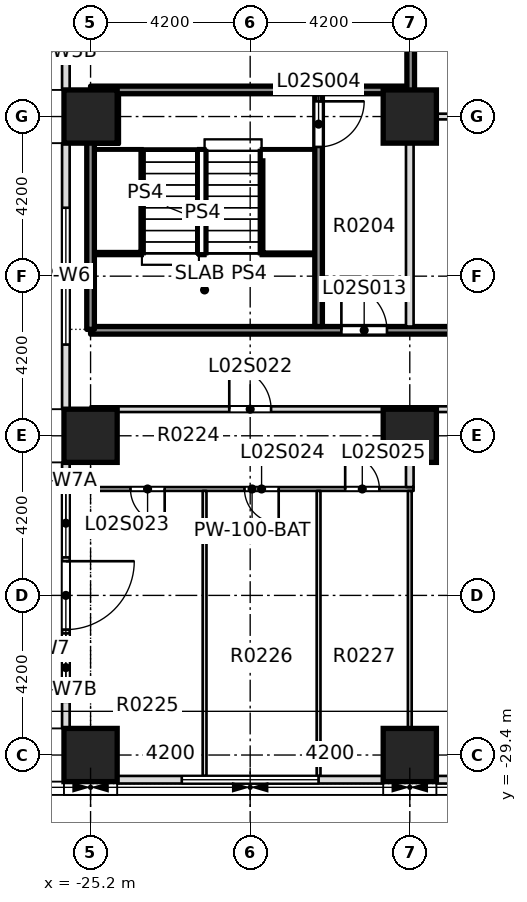
"""IFC4 building model, lengths in metres.
Left out: names, types, materials, properties, quantities, classifications, styles, units other than length and angle.
Written with IfcOpenShell. Run it as: python <this file> out.ifc"""

import sys

from ifc_helpers import new_model, si_unit, direction, frame, frame_2d, origin, origin_2d, place, context, subcontext, project, spatial, rectangle, extrude, element, fill, save


model = new_model("IFC4")
c1 = context("Model", 3, precision=1e-05, world=origin(), true_north=direction((0.0, 1.0)))
c2 = subcontext(c1, "Body", "Model", "MODEL_VIEW")
j1 = project(units=[si_unit("LENGTHUNIT", "METRE"), si_unit("PLANEANGLEUNIT", "RADIAN")], contexts=[c1])
p1 = place(None, origin())
s1 = spatial("IfcSite", under=j1, at=p1, CompositionType="ELEMENT")
p2 = place(p1, origin())
s2 = spatial("IfcBuilding", under=s1, at=p2, CompositionType="ELEMENT")
p3 = place(p2, frame((0.0, 0.0, 12.5)))
s3 = spatial("IfcBuildingStorey", under=s2, at=p3, CompositionType="ELEMENT", Elevation=12.5)
for number, where, z_axis, x_axis in (
    (1, (-16.8, -21.0, -0.4), (0.0, 0.0, 1.0), (1.0, 0.0, 0.0)),
    (2, (-25.2, -12.6, -0.4), (0.0, 0.0, 1.0), (1.0, 0.0, 0.0)),
    (3, (-16.8, -12.6, -0.4), (0.0, 0.0, 1.0), (1.0, 0.0, 0.0)),
    (4, (-25.2, -29.4, 0.0), (0.0, 0.0, 1.0), (1.0, 0.0, 0.0)),
    (5, (-16.8, -29.4, 0.0), (0.0, 0.0, 1.0), (1.0, 0.0, 0.0)),
    (6, (-25.2, -21.0, 0.0), (0.0, 0.0, 1.0), (1.0, 0.0, 0.0)),
):
    element("IfcColumn", number, at=place(p3, frame(where, z_axis=z_axis, x_axis=x_axis)), inside=s3, PredefinedType="COLUMN", context=c2, shape_type="SweptSolid", body=[
        extrude(rectangle(XDim=1.4, YDim=1.4, at=origin_2d()), origin(), (0.0, 0.0, 1.0), 7.5),
    ])
p4 = place(p3, frame((-25.2, -22.4, 0.0), z_axis=(0.0, 0.0, 1.0), x_axis=(1.0, 0.0, 0.0)))
e7 = element("IfcWall", 7, at=p4, inside=s3, PredefinedType="PARTITIONING", context=c2, shape_type="SweptSolid", body=[
    extrude(rectangle(XDim=8.5, YDim=0.1, at=frame_2d((4.25, 0.0))), origin(), (0.0, 0.0, 1.0), 7.1),
])
p5 = place(p4, frame((1.05, 0.0, 0.0)))
e8 = element("IfcOpeningElement", 8, at=p5, cuts=e7, PredefinedType="OPENING", context=c2, shape_type="SweptSolid", body=[
    extrude(rectangle(XDim=0.9, YDim=2.1, at=frame_2d((0.45, 1.05))), frame((0.0, 0.06, 0.0), z_axis=(0.0, -1.0, 0.0), x_axis=(1.0, 0.0, 0.0)), (0.0, 0.0, 1.0), 0.12),
])
p6 = place(p4, frame((4.05, 0.0, 0.0)))
e9 = element("IfcOpeningElement", 9, at=p6, cuts=e7, PredefinedType="OPENING", context=c2, shape_type="SweptSolid", body=[
    extrude(rectangle(XDim=0.9, YDim=2.1, at=frame_2d((0.45, 1.05))), frame((0.0, 0.06, 0.0), z_axis=(0.0, -1.0, 0.0), x_axis=(1.0, 0.0, 0.0)), (0.0, 0.0, 1.0), 0.12),
])
p7 = place(p4, frame((6.7, 0.0, 0.0)))
e10 = element("IfcOpeningElement", 10, at=p7, cuts=e7, PredefinedType="OPENING", context=c2, shape_type="SweptSolid", body=[
    extrude(rectangle(XDim=0.9, YDim=2.1, at=frame_2d((0.45, 1.05))), frame((0.0, 0.06, 0.0), z_axis=(0.0, -1.0, 0.0), x_axis=(1.0, 0.0, 0.0)), (0.0, 0.0, 1.0), 0.12),
])
p8 = place(p3, frame((-25.2, -20.3, 0.0), z_axis=(0.0, 0.0, 1.0), x_axis=(1.0, 0.0, 0.0)))
e11 = element("IfcWall", 11, at=p8, inside=s3, PredefinedType="PARTITIONING", context=c2, shape_type="SweptSolid", body=[
    extrude(rectangle(XDim=58.875, YDim=0.15, at=frame_2d((29.438, 0.0))), origin(), (0.0, 0.0, 1.0), 7.1),
])
p9 = place(p8, frame((3.65, 0.0, 0.0)))
e12 = element("IfcOpeningElement", 12, at=p9, cuts=e11, PredefinedType="OPENING", context=c2, shape_type="SweptSolid", body=[
    extrude(rectangle(XDim=1.1, YDim=2.1, at=frame_2d((0.55, 1.05))), frame((0.0, 0.085, 0.0), z_axis=(0.0, -1.0, 0.0), x_axis=(1.0, 0.0, 0.0)), (0.0, 0.0, 1.0), 0.17),
])
p10 = place(p8, frame((11.5, 0.0, 0.0)))
e13 = element("IfcOpeningElement", 13, at=p10, cuts=e11, PredefinedType="OPENING", context=c2, shape_type="SweptSolid", body=[
    extrude(rectangle(XDim=1.2, YDim=2.1, at=frame_2d((0.6, 1.05))), frame((0.0, 0.085, 0.0), z_axis=(0.0, -1.0, 0.0), x_axis=(1.0, 0.0, 0.0)), (0.0, 0.0, 1.0), 0.17),
])
p11 = place(p8, frame((20.55, 0.0, 0.0)))
e14 = element("IfcOpeningElement", 14, at=p11, cuts=e11, PredefinedType="OPENING", context=c2, shape_type="SweptSolid", body=[
    extrude(rectangle(XDim=0.9, YDim=2.1, at=frame_2d((0.45, 1.05))), frame((0.0, 0.085, 0.0), z_axis=(0.0, -1.0, 0.0), x_axis=(1.0, 0.0, 0.0)), (0.0, 0.0, 1.0), 0.17),
])
p12 = place(p8, frame((31.95, 0.0, 0.0)))
e15 = element("IfcOpeningElement", 15, at=p12, cuts=e11, PredefinedType="OPENING", context=c2, shape_type="SweptSolid", body=[
    extrude(rectangle(XDim=0.9, YDim=2.1, at=frame_2d((0.45, 1.05))), frame((0.0, 0.085, 0.0), z_axis=(0.0, -1.0, 0.0), x_axis=(1.0, 0.0, 0.0)), (0.0, 0.0, 1.0), 0.17),
])
p13 = place(p8, frame((45.65, 0.0, 0.0)))
e16 = element("IfcOpeningElement", 16, at=p13, cuts=e11, PredefinedType="OPENING", context=c2, shape_type="SweptSolid", body=[
    extrude(rectangle(XDim=1.1, YDim=2.1, at=frame_2d((0.55, 1.05))), frame((0.0, 0.085, 0.0), z_axis=(0.0, -1.0, 0.0), x_axis=(1.0, 0.0, 0.0)), (0.0, 0.0, 1.0), 0.17),
])
p14 = place(p8, frame((54.15, 0.0, 0.0)))
e17 = element("IfcOpeningElement", 17, at=p14, cuts=e11, PredefinedType="OPENING", context=c2, shape_type="SweptSolid", body=[
    extrude(rectangle(XDim=0.9, YDim=2.1, at=frame_2d((0.45, 1.05))), frame((0.0, 0.085, 0.0), z_axis=(0.0, -1.0, 0.0), x_axis=(1.0, 0.0, 0.0)), (0.0, 0.0, 1.0), 0.17),
])
p15 = place(p3, frame((-25.2, -18.225, 0.0), z_axis=(0.0, 0.0, 1.0), x_axis=(1.0, 0.0, 0.0)))
e18 = element("IfcWall", 18, at=p15, inside=s3, PredefinedType="SOLIDWALL", context=c2, shape_type="SweptSolid", body=[
    extrude(rectangle(XDim=12.95, YDim=0.2, at=frame_2d((6.475, 0.0))), origin(), (0.0, 0.0, 1.0), 7.1),
])
p16 = place(p15, frame((6.6, 0.0, 0.0)))
e19 = element("IfcOpeningElement", 19, at=p16, cuts=e18, PredefinedType="OPENING", context=c2, shape_type="SweptSolid", body=[
    extrude(rectangle(XDim=1.2, YDim=2.1, at=frame_2d((0.6, 1.05))), frame((0.0, 0.11, 0.0), z_axis=(0.0, -1.0, 0.0), x_axis=(1.0, 0.0, 0.0)), (0.0, 0.0, 1.0), 0.22),
])
p17 = place(p15, frame((10.425, 0.0, 0.0)))
e20 = element("IfcOpeningElement", 20, at=p17, cuts=e18, PredefinedType="OPENING", context=c2, shape_type="SweptSolid", body=[
    extrude(rectangle(XDim=0.7, YDim=2.1, at=frame_2d((0.35, 1.05))), frame((0.0, 0.11, 0.0), z_axis=(0.0, -1.0, 0.0), x_axis=(1.0, 0.0, 0.0)), (0.0, 0.0, 1.0), 0.22),
])
p18 = place(p3, frame((-16.9, -12.6, 0.0), z_axis=(0.0, 0.0, 1.0), x_axis=(1.0, 0.0, 0.0)))
e21 = element("IfcWall", 21, at=p18, inside=s3, PredefinedType="PARTITIONING", context=c2, shape_type="SweptSolid", body=[
    extrude(rectangle(XDim=9.625, YDim=0.15, at=frame_2d((4.812, 0.0))), origin(), (0.0, 0.0, 1.0), 7.1),
])
p19 = place(p3, frame((-25.2, -11.9, 0.0), z_axis=(0.0, 0.0, 1.0), x_axis=(1.0, 0.0, 0.0)))
e22 = element("IfcWall", 22, at=p19, inside=s3, PredefinedType="SOLIDWALL", context=c2, shape_type="SweptSolid", body=[
    extrude(rectangle(XDim=8.325, YDim=0.2, at=frame_2d((4.163, 0.0))), origin(), (0.0, 0.0, 1.0), 7.1),
])
for number, where, z_axis, x_axis in (
    (23, (-22.2, -29.95, 0.0), (0.0, 0.0, 1.0), (0.0, 1.0, 0.0)),
    (24, (-19.2, -29.95, 0.0), (0.0, 0.0, 1.0), (0.0, 1.0, 0.0)),
):
    element("IfcWall", number, at=place(p3, frame(where, z_axis=z_axis, x_axis=x_axis)), inside=s3, PredefinedType="PARTITIONING", context=c2, shape_type="SweptSolid", body=[
        extrude(rectangle(XDim=7.5, YDim=0.1, at=frame_2d((3.75, 0.0))), origin(), (0.0, 0.0, 1.0), 7.1),
    ])
p20 = place(p3, frame((-19.2, -18.125, 0.0), z_axis=(0.0, 0.0, 1.0), x_axis=(0.0, 1.0, 0.0)))
e25 = element("IfcWall", 25, at=p20, inside=s3, PredefinedType="SOLIDWALL", context=c2, shape_type="SweptSolid", body=[
    extrude(rectangle(XDim=6.125, YDim=0.2, at=frame_2d((3.062, 0.0))), origin(), (0.0, 0.0, 1.0), 7.1),
])
p21 = place(p20, frame((4.725, 0.0, 0.0)))
e26 = element("IfcOpeningElement", 26, at=p21, cuts=e25, PredefinedType="OPENING", context=c2, shape_type="SweptSolid", body=[
    extrude(rectangle(XDim=1.2, YDim=2.1, at=frame_2d((0.6, 1.05))), frame((0.0, 0.11, 0.0), z_axis=(0.0, -1.0, 0.0), x_axis=(1.0, 0.0, 0.0)), (0.0, 0.0, 1.0), 0.22),
])
p22 = place(p3, frame((-16.8, -29.95, 0.0), z_axis=(0.0, 0.0, 1.0), x_axis=(0.0, 1.0, 0.0)))
e27 = element("IfcWall", 27, at=p22, inside=s3, PredefinedType="PARTITIONING", context=c2, shape_type="SweptSolid", body=[
    extrude(rectangle(XDim=7.5, YDim=0.1, at=frame_2d((3.75, 0.0))), origin(), (0.0, 0.0, 1.0), 7.1),
])
p23 = place(p3, frame((-16.8, -22.35, 0.0), z_axis=(0.0, 0.0, 1.0), x_axis=(0.0, 1.0, 0.0)))
e28 = element("IfcWall", 28, at=p23, inside=s3, PredefinedType="PARTITIONING", context=c2, shape_type="SweptSolid", body=[
    extrude(rectangle(XDim=1.975, YDim=0.2, at=frame_2d((0.988, 0.0))), origin(), (0.0, 0.0, 1.0), 7.1),
])
p24 = place(p3, frame((-16.8, -18.125, 0.0), z_axis=(0.0, 0.0, 1.0), x_axis=(0.0, 1.0, 0.0)))
e29 = element("IfcWall", 29, at=p24, inside=s3, PredefinedType="PARTITIONING", context=c2, shape_type="SweptSolid", body=[
    extrude(rectangle(XDim=5.45, YDim=0.2, at=frame_2d((2.725, 0.0))), origin(), (0.0, 0.0, 1.0), 7.1),
])
p25 = place(p3, frame((-16.775, -12.525, 0.0), z_axis=(0.0, 0.0, 1.0), x_axis=(-0.000727609751, 0.999999735292, 0.0)))
e30 = element("IfcWall", 30, at=p25, inside=s3, PredefinedType="SOLIDWALL", context=c2, shape_type="SweptSolid", body=[
    extrude(rectangle(XDim=34.225, YDim=0.2, at=frame_2d((17.112, 0.0))), origin(), (0.0, 0.0, 1.0), 7.1),
])
p26 = place(p25, frame((16.225, 0.0, 0.0)))
e31 = element("IfcOpeningElement", 31, at=p26, cuts=e30, PredefinedType="OPENING", context=c2, shape_type="SweptSolid", body=[
    extrude(rectangle(XDim=0.9, YDim=2.1, at=frame_2d((0.45, 1.05))), frame((0.0, 0.11, 0.0), z_axis=(0.0, -1.0, 0.0), x_axis=(1.0, 0.0, 0.0)), (0.0, 0.0, 1.0), 0.22),
])
p27 = place(p3, frame((-24.5, -30.05, 0.0), z_axis=(0.0, 0.0, 1.0), x_axis=(1.0, 0.0, 0.0)))
e32 = element("IfcWall", 32, at=p27, inside=s3, PredefinedType="STANDARD", context=c2, shape_type="SweptSolid", body=[
    extrude(rectangle(XDim=7.0, YDim=0.2, at=frame_2d((3.5, 0.0))), origin(), (0.0, 0.0, 1.0), 7.1),
])
p28 = place(p27, frame((1.7, 0.0, 0.9)))
e33 = element("IfcOpeningElement", 33, at=p28, cuts=e32, PredefinedType="OPENING", context=c2, shape_type="SweptSolid", body=[
    extrude(rectangle(XDim=3.6, YDim=4.2, at=frame_2d((1.8, 2.1))), frame((0.0, 0.11, 0.0), z_axis=(0.0, -1.0, 0.0), x_axis=(1.0, 0.0, 0.0)), (0.0, 0.0, 1.0), 0.22),
])
p29 = place(p3, frame((-16.1, -30.05, 0.0), z_axis=(0.0, 0.0, 1.0), x_axis=(1.0, 0.0, 0.0)))
e34 = element("IfcWall", 34, at=p29, inside=s3, PredefinedType="STANDARD", context=c2, shape_type="SweptSolid", body=[
    extrude(rectangle(XDim=7.0, YDim=0.2, at=frame_2d((3.5, 0.0))), origin(), (0.0, 0.0, 1.0), 7.1),
])
p30 = place(p29, frame((1.7, 0.0, 0.9)))
e35 = element("IfcOpeningElement", 35, at=p30, cuts=e34, PredefinedType="OPENING", context=c2, shape_type="SweptSolid", body=[
    extrude(rectangle(XDim=3.6, YDim=4.2, at=frame_2d((1.8, 2.1))), frame((0.0, 0.11, 0.0), z_axis=(0.0, -1.0, 0.0), x_axis=(1.0, 0.0, 0.0)), (0.0, 0.0, 1.0), 0.22),
])
p31 = place(p3, frame((-25.85, -4.9, 0.0), z_axis=(0.0, 0.0, 1.0), x_axis=(0.0, -1.0, 0.0)))
e36 = element("IfcWall", 36, at=p31, inside=s3, PredefinedType="STANDARD", context=c2, shape_type="SweptSolid", body=[
    extrude(rectangle(XDim=7.0, YDim=0.2, at=frame_2d((3.5, 0.0))), origin(), (0.0, 0.0, 1.0), 7.1),
])
p32 = place(p31, frame((0.7, 0.0, 0.9)))
e37 = element("IfcOpeningElement", 37, at=p32, cuts=e36, PredefinedType="OPENING", context=c2, shape_type="SweptSolid", body=[
    extrude(rectangle(XDim=1.8, YDim=4.2, at=frame_2d((0.9, 2.1))), frame((0.0, 0.11, 0.0), z_axis=(0.0, -1.0, 0.0), x_axis=(1.0, 0.0, 0.0)), (0.0, 0.0, 1.0), 0.22),
])
p33 = place(p31, frame((2.6, 0.0, 0.0)))
e38 = element("IfcOpeningElement", 38, at=p33, cuts=e36, PredefinedType="OPENING", context=c2, shape_type="SweptSolid", body=[
    extrude(rectangle(XDim=1.8, YDim=2.4, at=frame_2d((0.9, 1.2))), frame((0.0, 0.11, 0.0), z_axis=(0.0, -1.0, 0.0), x_axis=(1.0, 0.0, 0.0)), (0.0, 0.0, 1.0), 0.22),
])
p34 = place(p31, frame((4.5, 0.0, 0.9)))
e39 = element("IfcOpeningElement", 39, at=p34, cuts=e36, PredefinedType="OPENING", context=c2, shape_type="SweptSolid", body=[
    extrude(rectangle(XDim=1.8, YDim=4.2, at=frame_2d((0.9, 2.1))), frame((0.0, 0.11, 0.0), z_axis=(0.0, -1.0, 0.0), x_axis=(1.0, 0.0, 0.0)), (0.0, 0.0, 1.0), 0.22),
])
p35 = place(p3, frame((-25.85, -13.3, 0.0), z_axis=(0.0, 0.0, 1.0), x_axis=(0.0, -1.0, 0.0)))
e40 = element("IfcWall", 40, at=p35, inside=s3, PredefinedType="STANDARD", context=c2, shape_type="SweptSolid", body=[
    extrude(rectangle(XDim=7.0, YDim=0.2, at=frame_2d((3.5, 0.0))), origin(), (0.0, 0.0, 1.0), 7.1),
])
p36 = place(p35, frame((1.7, 0.0, 0.9)))
e41 = element("IfcOpeningElement", 41, at=p36, cuts=e40, PredefinedType="OPENING", context=c2, shape_type="SweptSolid", body=[
    extrude(rectangle(XDim=3.6, YDim=4.2, at=frame_2d((1.8, 2.1))), frame((0.0, 0.11, 0.0), z_axis=(0.0, -1.0, 0.0), x_axis=(1.0, 0.0, 0.0)), (0.0, 0.0, 1.0), 0.22),
])
p37 = place(p3, frame((-25.85, -21.7, 0.0), z_axis=(0.0, 0.0, 1.0), x_axis=(0.0, -1.0, 0.0)))
e42 = element("IfcWall", 42, at=p37, inside=s3, PredefinedType="STANDARD", context=c2, shape_type="SweptSolid", body=[
    extrude(rectangle(XDim=7.0, YDim=0.2, at=frame_2d((3.5, 0.0))), origin(), (0.0, 0.0, 1.0), 7.1),
])
p38 = place(p37, frame((0.7, 0.0, 0.9)))
e43 = element("IfcOpeningElement", 43, at=p38, cuts=e42, PredefinedType="OPENING", context=c2, shape_type="SweptSolid", body=[
    extrude(rectangle(XDim=1.8, YDim=4.2, at=frame_2d((0.9, 2.1))), frame((0.0, 0.11, 0.0), z_axis=(0.0, -1.0, 0.0), x_axis=(1.0, 0.0, 0.0)), (0.0, 0.0, 1.0), 0.22),
])
p39 = place(p37, frame((2.6, 0.0, 0.0)))
e44 = element("IfcOpeningElement", 44, at=p39, cuts=e42, PredefinedType="OPENING", context=c2, shape_type="SweptSolid", body=[
    extrude(rectangle(XDim=1.8, YDim=2.4, at=frame_2d((0.9, 1.2))), frame((0.0, 0.11, 0.0), z_axis=(0.0, -1.0, 0.0), x_axis=(1.0, 0.0, 0.0)), (0.0, 0.0, 1.0), 0.22),
])
p40 = place(p37, frame((4.5, 0.0, 0.9)))
e45 = element("IfcOpeningElement", 45, at=p40, cuts=e42, PredefinedType="OPENING", context=c2, shape_type="SweptSolid", body=[
    extrude(rectangle(XDim=1.8, YDim=4.2, at=frame_2d((0.9, 2.1))), frame((0.0, 0.11, 0.0), z_axis=(0.0, -1.0, 0.0), x_axis=(1.0, 0.0, 0.0)), (0.0, 0.0, 1.0), 0.22),
])
p41 = place(p3, frame((-25.2, -18.2, 0.0), z_axis=(0.0, 0.0, 1.0), x_axis=(0.0, 1.0, 0.0)))
e46 = element("IfcWall", 46, at=p41, inside=s3, PredefinedType="SOLIDWALL", context=c2, shape_type="SweptSolid", body=[
    extrude(rectangle(XDim=5.3, YDim=0.2, at=frame_2d((2.65, 0.0))), origin(), (0.0, 0.0, 1.0), 7.1),
])
p42 = place(p21, origin())
e47 = element("IfcDoor", 47, at=p42, inside=s3, OperationType="DOUBLE_DOOR_SINGLE_SWING", PredefinedType="DOOR", context=c2, shape_type="SweptSolid", body=[
    extrude(rectangle(XDim=1.2, YDim=2.1, at=frame_2d((0.6, 1.05))), frame((0.0, 0.025, 0.0), z_axis=(0.0, -1.0, 0.0), x_axis=(1.0, 0.0, 0.0)), (0.0, 0.0, 1.0), 0.05),
])
fill(e26, e47)
p43 = place(p16, origin())
e48 = element("IfcDoor", 48, at=p43, inside=s3, OperationType="SINGLE_SWING_RIGHT", PredefinedType="DOOR", context=c2, shape_type="SweptSolid", body=[
    extrude(rectangle(XDim=1.2, YDim=2.1, at=frame_2d((0.6, 1.05))), frame((0.0, 0.025, 0.0), z_axis=(0.0, -1.0, 0.0), x_axis=(1.0, 0.0, 0.0)), (0.0, 0.0, 1.0), 0.05),
])
fill(e19, e48)
p44 = place(p9, origin())
e49 = element("IfcDoor", 49, at=p44, inside=s3, OperationType="SINGLE_SWING_RIGHT", PredefinedType="DOOR", context=c2, shape_type="SweptSolid", body=[
    extrude(rectangle(XDim=1.1, YDim=2.1, at=frame_2d((0.55, 1.05))), frame((0.0, 0.025, 0.0), z_axis=(0.0, -1.0, 0.0), x_axis=(1.0, 0.0, 0.0)), (0.0, 0.0, 1.0), 0.05),
])
fill(e12, e49)
p45 = place(p5, origin())
e50 = element("IfcDoor", 50, at=p45, inside=s3, OperationType="SINGLE_SWING_RIGHT", PredefinedType="DOOR", context=c2, shape_type="SweptSolid", body=[
    extrude(rectangle(XDim=0.9, YDim=2.1, at=frame_2d((0.45, 1.05))), frame((0.0, 0.025, 0.0), z_axis=(0.0, -1.0, 0.0), x_axis=(1.0, 0.0, 0.0)), (0.0, 0.0, 1.0), 0.05),
])
fill(e8, e50)
p46 = place(p6, origin())
e51 = element("IfcDoor", 51, at=p46, inside=s3, OperationType="SINGLE_SWING_RIGHT", PredefinedType="DOOR", context=c2, shape_type="SweptSolid", body=[
    extrude(rectangle(XDim=0.9, YDim=2.1, at=frame_2d((0.45, 1.05))), frame((0.0, 0.025, 0.0), z_axis=(0.0, -1.0, 0.0), x_axis=(1.0, 0.0, 0.0)), (0.0, 0.0, 1.0), 0.05),
])
fill(e9, e51)
p47 = place(p7, origin())
e52 = element("IfcDoor", 52, at=p47, inside=s3, OperationType="SINGLE_SWING_RIGHT", PredefinedType="DOOR", context=c2, shape_type="SweptSolid", body=[
    extrude(rectangle(XDim=0.9, YDim=2.1, at=frame_2d((0.45, 1.05))), frame((0.0, 0.025, 0.0), z_axis=(0.0, -1.0, 0.0), x_axis=(1.0, 0.0, 0.0)), (0.0, 0.0, 1.0), 0.05),
])
fill(e10, e52)
p48 = place(p28, origin())
e53 = element("IfcWindow", 53, at=p48, inside=s3, PartitioningType="SINGLE_PANEL", PredefinedType="WINDOW", context=c2, shape_type="SweptSolid", body=[
    extrude(rectangle(XDim=3.6, YDim=4.2, at=frame_2d((1.8, 2.1))), frame((0.0, 0.03, 0.0), z_axis=(0.0, -1.0, 0.0), x_axis=(1.0, 0.0, 0.0)), (0.0, 0.0, 1.0), 0.06),
])
fill(e33, e53)
p49 = place(p34, origin())
e54 = element("IfcWindow", 54, at=p49, inside=s3, PartitioningType="SINGLE_PANEL", PredefinedType="WINDOW", context=c2, shape_type="SweptSolid", body=[
    extrude(rectangle(XDim=1.8, YDim=4.2, at=frame_2d((0.9, 2.1))), frame((0.0, 0.03, 0.0), z_axis=(0.0, -1.0, 0.0), x_axis=(1.0, 0.0, 0.0)), (0.0, 0.0, 1.0), 0.06),
])
fill(e39, e54)
p50 = place(p36, origin())
e55 = element("IfcWindow", 55, at=p50, inside=s3, PartitioningType="SINGLE_PANEL", PredefinedType="WINDOW", context=c2, shape_type="SweptSolid", body=[
    extrude(rectangle(XDim=3.6, YDim=4.2, at=frame_2d((1.8, 2.1))), frame((0.0, 0.03, 0.0), z_axis=(0.0, -1.0, 0.0), x_axis=(1.0, 0.0, 0.0)), (0.0, 0.0, 1.0), 0.06),
])
fill(e41, e55)
p51 = place(p38, origin())
e56 = element("IfcWindow", 56, at=p51, inside=s3, PartitioningType="SINGLE_PANEL", PredefinedType="WINDOW", context=c2, shape_type="SweptSolid", body=[
    extrude(rectangle(XDim=1.8, YDim=4.2, at=frame_2d((0.9, 2.1))), frame((0.0, 0.03, 0.0), z_axis=(0.0, -1.0, 0.0), x_axis=(1.0, 0.0, 0.0)), (0.0, 0.0, 1.0), 0.06),
])
fill(e43, e56)
p52 = place(p39, origin())
e57 = element("IfcDoor", 57, at=p52, inside=s3, OperationType="SINGLE_SWING_LEFT", PredefinedType="DOOR", context=c2, shape_type="SweptSolid", body=[
    extrude(rectangle(XDim=1.8, YDim=2.4, at=frame_2d((0.9, 1.2))), frame((0.0, 0.025, 0.0), z_axis=(0.0, -1.0, 0.0), x_axis=(1.0, 0.0, 0.0)), (0.0, 0.0, 1.0), 0.05),
])
fill(e44, e57)
p53 = place(p40, origin())
e58 = element("IfcWindow", 58, at=p53, inside=s3, PartitioningType="SINGLE_PANEL", PredefinedType="WINDOW", context=c2, shape_type="SweptSolid", body=[
    extrude(rectangle(XDim=1.8, YDim=4.2, at=frame_2d((0.9, 2.1))), frame((0.0, 0.03, 0.0), z_axis=(0.0, -1.0, 0.0), x_axis=(1.0, 0.0, 0.0)), (0.0, 0.0, 1.0), 0.06),
])
fill(e45, e58)
save(model, sys.argv[1])
